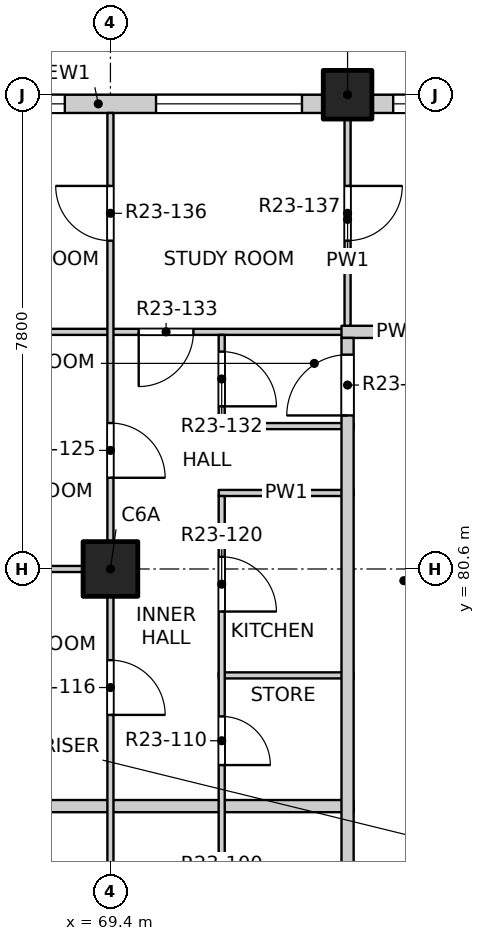
"""IFC4 building model, lengths in metres.
Left out: names, types, materials, properties, quantities, classifications, styles, units other than length and angle.
Written with IfcOpenShell. Run it as: python <this file> out.ifc"""

import sys

from ifc_helpers import new_model, si_unit, direction, frame, frame_2d, origin, origin_2d, place, context, subcontext, project, spatial, rectangle, extrude, element, fill, save


model = new_model("IFC4")
c1 = context("Model", 3, precision=1e-05, world=origin(), true_north=direction((0.0, 1.0)))
c2 = subcontext(c1, "Body", "Model", "MODEL_VIEW")
j1 = project(units=[si_unit("LENGTHUNIT", "METRE"), si_unit("PLANEANGLEUNIT", "RADIAN")], contexts=[c1])
p1 = place(None, origin())
s1 = spatial("IfcSite", under=j1, at=p1, CompositionType="ELEMENT")
p2 = place(p1, origin())
s2 = spatial("IfcBuilding", under=s1, at=p2, CompositionType="ELEMENT")
p3 = place(p2, frame((0.0, 0.0, 238.1)))
s3 = spatial("IfcBuildingStorey", under=s2, at=p3, CompositionType="ELEMENT", Elevation=238.1)
p4 = place(p3, frame((73.3, 88.4, -0.25), z_axis=(0.0, 0.0, 1.0), x_axis=(1.0, 0.0, 0.0)))
e1 = element("IfcColumn", 1, at=p4, inside=s3, PredefinedType="COLUMN", context=c2, shape_type="SweptSolid", body=[
    extrude(rectangle(XDim=0.8, YDim=0.8, at=origin_2d()), origin(), (0.0, 0.0, 1.0), 3.35),
])
p5 = place(p3, frame((69.4, 80.6, -0.25), z_axis=(0.0, 0.0, 1.0), x_axis=(1.0, 0.0, 0.0)))
e2 = element("IfcColumn", 2, at=p5, inside=s3, PredefinedType="COLUMN", context=c2, shape_type="SweptSolid", body=[
    extrude(rectangle(XDim=0.9, YDim=0.9, at=origin_2d()), origin(), (0.0, 0.0, 1.0), 3.35),
])
p6 = place(p3, frame((65.5, 88.25, 0.0), z_axis=(0.0, 0.0, 1.0), x_axis=(1.0, 0.0, 0.0)))
e3 = element("IfcWall", 3, at=p6, inside=s3, PredefinedType="SOLIDWALL", context=c2, shape_type="SweptSolid", body=[
    extrude(rectangle(XDim=7.4, YDim=0.3, at=frame_2d((3.7, 0.0))), origin(), (0.0, 0.0, 1.0), 3.1),
])
p7 = place(p6, frame((0.75, 0.0, 0.9)))
e4 = element("IfcOpeningElement", 4, at=p7, cuts=e3, PredefinedType="OPENING", context=c2, shape_type="SweptSolid", body=[
    extrude(rectangle(XDim=2.4, YDim=1.8, at=frame_2d((1.2, 0.9))), frame((0.0, 0.16, 0.0), z_axis=(0.0, -1.0, 0.0), x_axis=(1.0, 0.0, 0.0)), (0.0, 0.0, 1.0), 0.32),
])
p8 = place(p6, frame((4.65, 0.0, 0.9)))
e5 = element("IfcOpeningElement", 5, at=p8, cuts=e3, PredefinedType="OPENING", context=c2, shape_type="SweptSolid", body=[
    extrude(rectangle(XDim=2.4, YDim=1.8, at=frame_2d((1.2, 0.9))), frame((0.0, 0.16, 0.0), z_axis=(0.0, -1.0, 0.0), x_axis=(1.0, 0.0, 0.0)), (0.0, 0.0, 1.0), 0.32),
])
p9 = place(p3, frame((73.7, 88.25, 0.0), z_axis=(0.0, 0.0, 1.0), x_axis=(1.0, 0.0, 0.0)))
e6 = element("IfcWall", 6, at=p9, inside=s3, PredefinedType="SOLIDWALL", context=c2, shape_type="SweptSolid", body=[
    extrude(rectangle(XDim=22.6, YDim=0.3, at=frame_2d((11.3, 0.0))), origin(), (0.0, 0.0, 1.0), 3.1),
])
p10 = place(p9, frame((0.35, 0.0, 0.9)))
e7 = element("IfcOpeningElement", 7, at=p10, cuts=e6, PredefinedType="OPENING", context=c2, shape_type="SweptSolid", body=[
    extrude(rectangle(XDim=2.4, YDim=1.8, at=frame_2d((1.2, 0.9))), frame((0.0, 0.16, 0.0), z_axis=(0.0, -1.0, 0.0), x_axis=(1.0, 0.0, 0.0)), (0.0, 0.0, 1.0), 0.32),
])
p11 = place(p9, frame((4.25, 0.0, 0.9)))
e8 = element("IfcOpeningElement", 8, at=p11, cuts=e6, PredefinedType="OPENING", context=c2, shape_type="SweptSolid", body=[
    extrude(rectangle(XDim=2.4, YDim=1.8, at=frame_2d((1.2, 0.9))), frame((0.0, 0.16, 0.0), z_axis=(0.0, -1.0, 0.0), x_axis=(1.0, 0.0, 0.0)), (0.0, 0.0, 1.0), 0.32),
])
p12 = place(p9, frame((8.15, 0.0, 0.9)))
e9 = element("IfcOpeningElement", 9, at=p12, cuts=e6, PredefinedType="OPENING", context=c2, shape_type="SweptSolid", body=[
    extrude(rectangle(XDim=2.4, YDim=1.8, at=frame_2d((1.2, 0.9))), frame((0.0, 0.16, 0.0), z_axis=(0.0, -1.0, 0.0), x_axis=(1.0, 0.0, 0.0)), (0.0, 0.0, 1.0), 0.32),
])
p13 = place(p9, frame((12.05, 0.0, 0.9)))
e10 = element("IfcOpeningElement", 10, at=p13, cuts=e6, PredefinedType="OPENING", context=c2, shape_type="SweptSolid", body=[
    extrude(rectangle(XDim=2.4, YDim=1.8, at=frame_2d((1.2, 0.9))), frame((0.0, 0.16, 0.0), z_axis=(0.0, -1.0, 0.0), x_axis=(1.0, 0.0, 0.0)), (0.0, 0.0, 1.0), 0.32),
])
p14 = place(p9, frame((15.95, 0.0, 0.9)))
e11 = element("IfcOpeningElement", 11, at=p14, cuts=e6, PredefinedType="OPENING", context=c2, shape_type="SweptSolid", body=[
    extrude(rectangle(XDim=2.4, YDim=1.8, at=frame_2d((1.2, 0.9))), frame((0.0, 0.16, 0.0), z_axis=(0.0, -1.0, 0.0), x_axis=(1.0, 0.0, 0.0)), (0.0, 0.0, 1.0), 0.32),
])
p15 = place(p9, frame((19.85, 0.0, 0.9)))
e12 = element("IfcOpeningElement", 12, at=p15, cuts=e6, PredefinedType="OPENING", context=c2, shape_type="SweptSolid", body=[
    extrude(rectangle(XDim=2.4, YDim=1.8, at=frame_2d((1.2, 0.9))), frame((0.0, 0.16, 0.0), z_axis=(0.0, -1.0, 0.0), x_axis=(1.0, 0.0, 0.0)), (0.0, 0.0, 1.0), 0.32),
])
p16 = place(p3, frame((61.9, 76.7, 0.0), z_axis=(0.0, 0.0, 1.0), x_axis=(1.0, 0.0, 0.0)))
e13 = element("IfcWall", 13, at=p16, inside=s3, PredefinedType="PARTITIONING", context=c2, shape_type="SweptSolid", body=[
    extrude(rectangle(XDim=11.5, YDim=0.2, at=frame_2d((5.75, 0.0))), origin(), (0.0, 0.0, 1.0), 3.1),
])
p17 = place(p3, frame((71.18, 78.85, 0.0), z_axis=(0.0, 0.0, 1.0), x_axis=(1.0, 0.0, 0.0)))
e14 = element("IfcWall", 14, at=p17, inside=s3, PredefinedType="PARTITIONING", context=c2, shape_type="SweptSolid", body=[
    extrude(rectangle(XDim=2.22, YDim=0.1, at=frame_2d((1.11, 0.0))), origin(), (0.0, 0.0, 1.0), 3.1),
])
p18 = place(p3, frame((61.9, 80.6, 0.0), z_axis=(0.0, 0.0, 1.0), x_axis=(1.0, 0.0, 0.0)))
e15 = element("IfcWall", 15, at=p18, inside=s3, PredefinedType="PARTITIONING", context=c2, shape_type="SweptSolid", body=[
    extrude(rectangle(XDim=7.55, YDim=0.1, at=frame_2d((3.775, 0.0))), origin(), (0.0, 0.0, 1.0), 3.1),
])
for number, where, z_axis, x_axis in (
    (16, (71.18, 81.85, 0.0), (0.0, 0.0, 1.0), (1.0, 0.0, 0.0)),
    (17, (71.18, 82.95, 0.0), (0.0, 0.0, 1.0), (1.0, 0.0, 0.0)),
):
    element("IfcWall", number, at=place(p3, frame(where, z_axis=z_axis, x_axis=x_axis)), inside=s3, PredefinedType="PARTITIONING", context=c2, shape_type="SweptSolid", body=[
        extrude(rectangle(XDim=2.22, YDim=0.1, at=frame_2d((1.11, 0.0))), origin(), (0.0, 0.0, 1.0), 3.1),
    ])
p19 = place(p3, frame((61.9, 84.5, 0.0), z_axis=(0.0, 0.0, 1.0), x_axis=(1.0, 0.0, 0.0)))
e18 = element("IfcWall", 18, at=p19, inside=s3, PredefinedType="PARTITIONING", context=c2, shape_type="SweptSolid", body=[
    extrude(rectangle(XDim=11.5, YDim=0.1, at=frame_2d((5.75, 0.0))), origin(), (0.0, 0.0, 1.0), 3.1),
])
p20 = place(p19, frame((7.965, 0.0, 0.0)))
e19 = element("IfcOpeningElement", 19, at=p20, cuts=e18, PredefinedType="OPENING", context=c2, shape_type="SweptSolid", body=[
    extrude(rectangle(XDim=0.9, YDim=2.1, at=frame_2d((0.45, 1.05))), frame((0.0, 0.06, 0.0), z_axis=(0.0, -1.0, 0.0), x_axis=(1.0, 0.0, 0.0)), (0.0, 0.0, 1.0), 0.12),
])
p21 = place(p3, frame((73.2, 84.5, 0.0), z_axis=(0.0, 0.0, 1.0), x_axis=(1.0, 0.0, 0.0)))
e20 = element("IfcWall", 20, at=p21, inside=s3, PredefinedType="PARTITIONING", context=c2, shape_type="SweptSolid", body=[
    extrude(rectangle(XDim=1.85, YDim=0.2, at=frame_2d((0.925, 0.0))), origin(), (0.0, 0.0, 1.0), 3.1),
])
p22 = place(p3, frame((69.4, 41.9, 0.0), z_axis=(0.0, 0.0, 1.0), x_axis=(0.0, 1.0, 0.0)))
e21 = element("IfcWall", 21, at=p22, inside=s3, PredefinedType="PARTITIONING", context=c2, shape_type="SweptSolid", body=[
    extrude(rectangle(XDim=46.2, YDim=0.1, at=frame_2d((23.1, 0.0))), origin(), (0.0, 0.0, 1.0), 3.1),
])
p23 = place(p22, frame((1.2, 0.0, 0.0)))
e22 = element("IfcOpeningElement", 22, at=p23, cuts=e21, PredefinedType="OPENING", context=c2, shape_type="SweptSolid", body=[
    extrude(rectangle(XDim=0.9, YDim=2.1, at=frame_2d((0.45, 1.05))), frame((0.0, 0.06, 0.0), z_axis=(0.0, -1.0, 0.0), x_axis=(1.0, 0.0, 0.0)), (0.0, 0.0, 1.0), 0.12),
])
p24 = place(p22, frame((6.025, 0.0, 0.0)))
e23 = element("IfcOpeningElement", 23, at=p24, cuts=e21, PredefinedType="OPENING", context=c2, shape_type="SweptSolid", body=[
    extrude(rectangle(XDim=0.9, YDim=2.1, at=frame_2d((0.45, 1.05))), frame((0.0, 0.06, 0.0), z_axis=(0.0, -1.0, 0.0), x_axis=(1.0, 0.0, 0.0)), (0.0, 0.0, 1.0), 0.12),
])
p25 = place(p22, frame((9.975, 0.0, 0.0)))
e24 = element("IfcOpeningElement", 24, at=p25, cuts=e21, PredefinedType="OPENING", context=c2, shape_type="SweptSolid", body=[
    extrude(rectangle(XDim=0.9, YDim=2.1, at=frame_2d((0.45, 1.05))), frame((0.0, 0.06, 0.0), z_axis=(0.0, -1.0, 0.0), x_axis=(1.0, 0.0, 0.0)), (0.0, 0.0, 1.0), 0.12),
])
p26 = place(p22, frame((12.9, 0.0, 0.0)))
e25 = element("IfcOpeningElement", 25, at=p26, cuts=e21, PredefinedType="OPENING", context=c2, shape_type="SweptSolid", body=[
    extrude(rectangle(XDim=0.9, YDim=2.1, at=frame_2d((0.45, 1.05))), frame((0.0, 0.06, 0.0), z_axis=(0.0, -1.0, 0.0), x_axis=(1.0, 0.0, 0.0)), (0.0, 0.0, 1.0), 0.12),
])
p27 = place(p22, frame((17.775, 0.0, 0.0)))
e26 = element("IfcOpeningElement", 26, at=p27, cuts=e21, PredefinedType="OPENING", context=c2, shape_type="SweptSolid", body=[
    extrude(rectangle(XDim=0.9, YDim=2.1, at=frame_2d((0.45, 1.05))), frame((0.0, 0.06, 0.0), z_axis=(0.0, -1.0, 0.0), x_axis=(1.0, 0.0, 0.0)), (0.0, 0.0, 1.0), 0.12),
])
p28 = place(p22, frame((21.625, 0.0, 0.0)))
e27 = element("IfcOpeningElement", 27, at=p28, cuts=e21, PredefinedType="OPENING", context=c2, shape_type="SweptSolid", body=[
    extrude(rectangle(XDim=0.9, YDim=2.1, at=frame_2d((0.45, 1.05))), frame((0.0, 0.06, 0.0), z_axis=(0.0, -1.0, 0.0), x_axis=(1.0, 0.0, 0.0)), (0.0, 0.0, 1.0), 0.12),
])
p29 = place(p22, frame((25.575, 0.0, 0.0)))
e28 = element("IfcOpeningElement", 28, at=p29, cuts=e21, PredefinedType="OPENING", context=c2, shape_type="SweptSolid", body=[
    extrude(rectangle(XDim=0.9, YDim=2.1, at=frame_2d((0.45, 1.05))), frame((0.0, 0.06, 0.0), z_axis=(0.0, -1.0, 0.0), x_axis=(1.0, 0.0, 0.0)), (0.0, 0.0, 1.0), 0.12),
])
p30 = place(p22, frame((28.5, 0.0, 0.0)))
e29 = element("IfcOpeningElement", 29, at=p30, cuts=e21, PredefinedType="OPENING", context=c2, shape_type="SweptSolid", body=[
    extrude(rectangle(XDim=0.9, YDim=2.1, at=frame_2d((0.45, 1.05))), frame((0.0, 0.06, 0.0), z_axis=(0.0, -1.0, 0.0), x_axis=(1.0, 0.0, 0.0)), (0.0, 0.0, 1.0), 0.12),
])
p31 = place(p22, frame((32.4, 0.0, 0.0)))
e30 = element("IfcOpeningElement", 30, at=p31, cuts=e21, PredefinedType="OPENING", context=c2, shape_type="SweptSolid", body=[
    extrude(rectangle(XDim=0.9, YDim=2.1, at=frame_2d((0.45, 1.05))), frame((0.0, 0.06, 0.0), z_axis=(0.0, -1.0, 0.0), x_axis=(1.0, 0.0, 0.0)), (0.0, 0.0, 1.0), 0.12),
])
p32 = place(p22, frame((36.3, 0.0, 0.0)))
e31 = element("IfcOpeningElement", 31, at=p32, cuts=e21, PredefinedType="OPENING", context=c2, shape_type="SweptSolid", body=[
    extrude(rectangle(XDim=0.9, YDim=2.1, at=frame_2d((0.45, 1.05))), frame((0.0, 0.06, 0.0), z_axis=(0.0, -1.0, 0.0), x_axis=(1.0, 0.0, 0.0)), (0.0, 0.0, 1.0), 0.12),
])
p33 = place(p22, frame((40.2, 0.0, 0.0)))
e32 = element("IfcOpeningElement", 32, at=p33, cuts=e21, PredefinedType="OPENING", context=c2, shape_type="SweptSolid", body=[
    extrude(rectangle(XDim=0.9, YDim=2.1, at=frame_2d((0.45, 1.05))), frame((0.0, 0.06, 0.0), z_axis=(0.0, -1.0, 0.0), x_axis=(1.0, 0.0, 0.0)), (0.0, 0.0, 1.0), 0.12),
])
p34 = place(p22, frame((44.1, 0.0, 0.0)))
e33 = element("IfcOpeningElement", 33, at=p34, cuts=e21, PredefinedType="OPENING", context=c2, shape_type="SweptSolid", body=[
    extrude(rectangle(XDim=0.9, YDim=2.1, at=frame_2d((0.45, 1.05))), frame((0.0, 0.06, 0.0), z_axis=(0.0, -1.0, 0.0), x_axis=(1.0, 0.0, 0.0)), (0.0, 0.0, 1.0), 0.12),
])
p35 = place(p3, frame((71.23, 63.95, 0.0), z_axis=(0.0, 0.0, 1.0), x_axis=(0.0, 1.0, 0.0)))
e34 = element("IfcWall", 34, at=p35, inside=s3, PredefinedType="PARTITIONING", context=c2, shape_type="SweptSolid", body=[
    extrude(rectangle(XDim=17.85, YDim=0.1, at=frame_2d((8.925, 0.0))), origin(), (0.0, 0.0, 1.0), 3.1),
])
p36 = place(p35, frame((0.7, 0.0, 0.0)))
e35 = element("IfcOpeningElement", 35, at=p36, cuts=e34, PredefinedType="OPENING", context=c2, shape_type="SweptSolid", body=[
    extrude(rectangle(XDim=0.9, YDim=2.1, at=frame_2d((0.45, 1.05))), frame((0.0, 0.06, 0.0), z_axis=(0.0, -1.0, 0.0), x_axis=(1.0, 0.0, 0.0)), (0.0, 0.0, 1.0), 0.12),
])
p37 = place(p35, frame((3.1, 0.0, 0.0)))
e36 = element("IfcOpeningElement", 36, at=p37, cuts=e34, PredefinedType="OPENING", context=c2, shape_type="SweptSolid", body=[
    extrude(rectangle(XDim=0.8, YDim=2.1, at=frame_2d((0.4, 1.05))), frame((0.0, 0.06, 0.0), z_axis=(0.0, -1.0, 0.0), x_axis=(1.0, 0.0, 0.0)), (0.0, 0.0, 1.0), 0.12),
])
p38 = place(p35, frame((5.115, 0.0, 0.0)))
e37 = element("IfcOpeningElement", 37, at=p38, cuts=e34, PredefinedType="OPENING", context=c2, shape_type="SweptSolid", body=[
    extrude(rectangle(XDim=0.9, YDim=2.1, at=frame_2d((0.45, 1.05))), frame((0.0, 0.06, 0.0), z_axis=(0.0, -1.0, 0.0), x_axis=(1.0, 0.0, 0.0)), (0.0, 0.0, 1.0), 0.12),
])
p39 = place(p35, frame((7.455, 0.0, 0.0)))
e38 = element("IfcOpeningElement", 38, at=p39, cuts=e34, PredefinedType="OPENING", context=c2, shape_type="SweptSolid", body=[
    extrude(rectangle(XDim=0.8, YDim=2.1, at=frame_2d((0.4, 1.05))), frame((0.0, 0.06, 0.0), z_axis=(0.0, -1.0, 0.0), x_axis=(1.0, 0.0, 0.0)), (0.0, 0.0, 1.0), 0.12),
])
p40 = place(p35, frame((10.54, 0.0, 0.0)))
e39 = element("IfcOpeningElement", 39, at=p40, cuts=e34, PredefinedType="OPENING", context=c2, shape_type="SweptSolid", body=[
    extrude(rectangle(XDim=0.9, YDim=2.1, at=frame_2d((0.45, 1.05))), frame((0.0, 0.06, 0.0), z_axis=(0.0, -1.0, 0.0), x_axis=(1.0, 0.0, 0.0)), (0.0, 0.0, 1.0), 0.12),
])
p41 = place(p35, frame((13.425, 0.0, 0.0)))
e40 = element("IfcOpeningElement", 40, at=p41, cuts=e34, PredefinedType="OPENING", context=c2, shape_type="SweptSolid", body=[
    extrude(rectangle(XDim=0.8, YDim=2.1, at=frame_2d((0.4, 1.05))), frame((0.0, 0.06, 0.0), z_axis=(0.0, -1.0, 0.0), x_axis=(1.0, 0.0, 0.0)), (0.0, 0.0, 1.0), 0.12),
])
p42 = place(p35, frame((15.95, 0.0, 0.0)))
e41 = element("IfcOpeningElement", 41, at=p42, cuts=e34, PredefinedType="OPENING", context=c2, shape_type="SweptSolid", body=[
    extrude(rectangle(XDim=0.9, YDim=2.1, at=frame_2d((0.45, 1.05))), frame((0.0, 0.06, 0.0), z_axis=(0.0, -1.0, 0.0), x_axis=(1.0, 0.0, 0.0)), (0.0, 0.0, 1.0), 0.12),
])
p43 = place(p3, frame((71.23, 83.0, 0.0), z_axis=(0.0, 0.0, 1.0), x_axis=(0.0, 1.0, 0.0)))
e42 = element("IfcWall", 42, at=p43, inside=s3, PredefinedType="PARTITIONING", context=c2, shape_type="SweptSolid", body=[
    extrude(rectangle(XDim=1.45, YDim=0.1, at=frame_2d((0.725, 0.0))), origin(), (0.0, 0.0, 1.0), 3.1),
])
p44 = place(p43, frame((0.275, 0.0, 0.0)))
e43 = element("IfcOpeningElement", 43, at=p44, cuts=e42, PredefinedType="OPENING", context=c2, shape_type="SweptSolid", body=[
    extrude(rectangle(XDim=0.9, YDim=2.1, at=frame_2d((0.45, 1.05))), frame((0.0, 0.06, 0.0), z_axis=(0.0, -1.0, 0.0), x_axis=(1.0, 0.0, 0.0)), (0.0, 0.0, 1.0), 0.12),
])
p45 = place(p3, frame((73.3, 49.5, 0.0), z_axis=(0.0, 0.0, 1.0), x_axis=(0.0, 1.0, 0.0)))
e44 = element("IfcWall", 44, at=p45, inside=s3, PredefinedType="PARTITIONING", context=c2, shape_type="SweptSolid", body=[
    extrude(rectangle(XDim=34.9, YDim=0.2, at=frame_2d((17.45, 0.0))), origin(), (0.0, 0.0, 1.0), 3.1),
])
p46 = place(p45, frame((3.075, 0.0, 0.0)))
e45 = element("IfcOpeningElement", 45, at=p46, cuts=e44, PredefinedType="OPENING", context=c2, shape_type="SweptSolid", body=[
    extrude(rectangle(XDim=1.0, YDim=2.1, at=frame_2d((0.5, 1.05))), frame((0.0, 0.11, 0.0), z_axis=(0.0, -1.0, 0.0), x_axis=(1.0, 0.0, 0.0)), (0.0, 0.0, 1.0), 0.22),
])
p47 = place(p45, frame((14.575, 0.0, 0.0)))
e46 = element("IfcOpeningElement", 46, at=p47, cuts=e44, PredefinedType="OPENING", context=c2, shape_type="SweptSolid", body=[
    extrude(rectangle(XDim=1.0, YDim=2.1, at=frame_2d((0.5, 1.05))), frame((0.0, 0.11, 0.0), z_axis=(0.0, -1.0, 0.0), x_axis=(1.0, 0.0, 0.0)), (0.0, 0.0, 1.0), 0.22),
])
p48 = place(p45, frame((33.625, 0.0, 0.0)))
e47 = element("IfcOpeningElement", 47, at=p48, cuts=e44, PredefinedType="OPENING", context=c2, shape_type="SweptSolid", body=[
    extrude(rectangle(XDim=1.0, YDim=2.1, at=frame_2d((0.5, 1.05))), frame((0.0, 0.11, 0.0), z_axis=(0.0, -1.0, 0.0), x_axis=(1.0, 0.0, 0.0)), (0.0, 0.0, 1.0), 0.22),
])
p49 = place(p3, frame((73.3, 84.6, 0.0), z_axis=(0.0, 0.0, 1.0), x_axis=(0.0, 1.0, 0.0)))
e48 = element("IfcWall", 48, at=p49, inside=s3, PredefinedType="PARTITIONING", context=c2, shape_type="SweptSolid", body=[
    extrude(rectangle(XDim=3.5, YDim=0.1, at=frame_2d((1.75, 0.0))), origin(), (0.0, 0.0, 1.0), 3.1),
])
p50 = place(p49, frame((1.4, 0.0, 0.0)))
e49 = element("IfcOpeningElement", 49, at=p50, cuts=e48, PredefinedType="OPENING", context=c2, shape_type="SweptSolid", body=[
    extrude(rectangle(XDim=0.9, YDim=2.1, at=frame_2d((0.45, 1.05))), frame((0.0, 0.06, 0.0), z_axis=(0.0, -1.0, 0.0), x_axis=(1.0, 0.0, 0.0)), (0.0, 0.0, 1.0), 0.12),
])
p51 = place(p7, origin())
e50 = element("IfcWindow", 50, at=p51, inside=s3, PartitioningType="DOUBLE_PANEL_VERTICAL", PredefinedType="WINDOW", context=c2, shape_type="SweptSolid", body=[
    extrude(rectangle(XDim=2.4, YDim=1.8, at=frame_2d((1.2, 0.9))), frame((0.0, 0.03, 0.0), z_axis=(0.0, -1.0, 0.0), x_axis=(1.0, 0.0, 0.0)), (0.0, 0.0, 1.0), 0.06),
])
fill(e4, e50)
p52 = place(p8, origin())
e51 = element("IfcWindow", 51, at=p52, inside=s3, PartitioningType="DOUBLE_PANEL_VERTICAL", PredefinedType="WINDOW", context=c2, shape_type="SweptSolid", body=[
    extrude(rectangle(XDim=2.4, YDim=1.8, at=frame_2d((1.2, 0.9))), frame((0.0, 0.03, 0.0), z_axis=(0.0, -1.0, 0.0), x_axis=(1.0, 0.0, 0.0)), (0.0, 0.0, 1.0), 0.06),
])
fill(e5, e51)
p53 = place(p10, origin())
e52 = element("IfcWindow", 52, at=p53, inside=s3, PartitioningType="DOUBLE_PANEL_VERTICAL", PredefinedType="WINDOW", context=c2, shape_type="SweptSolid", body=[
    extrude(rectangle(XDim=2.4, YDim=1.8, at=frame_2d((1.2, 0.9))), frame((0.0, 0.03, 0.0), z_axis=(0.0, -1.0, 0.0), x_axis=(1.0, 0.0, 0.0)), (0.0, 0.0, 1.0), 0.06),
])
fill(e7, e52)
p54 = place(p41, origin())
e53 = element("IfcDoor", 53, at=p54, inside=s3, OperationType="SINGLE_SWING_RIGHT", PredefinedType="DOOR", context=c2, shape_type="SweptSolid", body=[
    extrude(rectangle(XDim=0.8, YDim=2.1, at=frame_2d((0.4, 1.05))), frame((0.0, 0.025, 0.0), z_axis=(0.0, -1.0, 0.0), x_axis=(1.0, 0.0, 0.0)), (0.0, 0.0, 1.0), 0.05),
])
fill(e40, e53)
p55 = place(p32, origin())
e54 = element("IfcDoor", 54, at=p55, inside=s3, OperationType="SINGLE_SWING_RIGHT", PredefinedType="DOOR", context=c2, shape_type="SweptSolid", body=[
    extrude(rectangle(XDim=0.9, YDim=2.1, at=frame_2d((0.45, 1.05))), frame((0.0, 0.025, 0.0), z_axis=(0.0, -1.0, 0.0), x_axis=(1.0, 0.0, 0.0)), (0.0, 0.0, 1.0), 0.05),
])
fill(e31, e54)
p56 = place(p42, origin())
e55 = element("IfcDoor", 55, at=p56, inside=s3, OperationType="SINGLE_SWING_RIGHT", PredefinedType="DOOR", context=c2, shape_type="SweptSolid", body=[
    extrude(rectangle(XDim=0.9, YDim=2.1, at=frame_2d((0.45, 1.05))), frame((0.0, 0.025, 0.0), z_axis=(0.0, -1.0, 0.0), x_axis=(1.0, 0.0, 0.0)), (0.0, 0.0, 1.0), 0.05),
])
fill(e41, e55)
p57 = place(p33, origin())
e56 = element("IfcDoor", 56, at=p57, inside=s3, OperationType="SINGLE_SWING_RIGHT", PredefinedType="DOOR", context=c2, shape_type="SweptSolid", body=[
    extrude(rectangle(XDim=0.9, YDim=2.1, at=frame_2d((0.45, 1.05))), frame((0.0, 0.025, 0.0), z_axis=(0.0, -1.0, 0.0), x_axis=(1.0, 0.0, 0.0)), (0.0, 0.0, 1.0), 0.05),
])
fill(e32, e56)
p58 = place(p48, origin())
e57 = element("IfcDoor", 57, at=p58, inside=s3, OperationType="SINGLE_SWING_RIGHT", PredefinedType="DOOR", context=c2, shape_type="SweptSolid", body=[
    extrude(rectangle(XDim=1.0, YDim=2.1, at=frame_2d((0.5, 1.05))), frame((0.0, 0.025, 0.0), z_axis=(0.0, -1.0, 0.0), x_axis=(1.0, 0.0, 0.0)), (0.0, 0.0, 1.0), 0.05),
])
fill(e47, e57)
p59 = place(p44, origin())
e58 = element("IfcDoor", 58, at=p59, inside=s3, OperationType="SINGLE_SWING_RIGHT", PredefinedType="DOOR", context=c2, shape_type="SweptSolid", body=[
    extrude(rectangle(XDim=0.9, YDim=2.1, at=frame_2d((0.45, 1.05))), frame((0.0, 0.025, 0.0), z_axis=(0.0, -1.0, 0.0), x_axis=(1.0, 0.0, 0.0)), (0.0, 0.0, 1.0), 0.05),
])
fill(e43, e58)
p60 = place(p20, origin())
e59 = element("IfcDoor", 59, at=p60, inside=s3, OperationType="SINGLE_SWING_RIGHT", PredefinedType="DOOR", context=c2, shape_type="SweptSolid", body=[
    extrude(rectangle(XDim=0.9, YDim=2.1, at=frame_2d((0.45, 1.05))), frame((0.0, 0.025, 0.0), z_axis=(0.0, -1.0, 0.0), x_axis=(1.0, 0.0, 0.0)), (0.0, 0.0, 1.0), 0.05),
])
fill(e19, e59)
p61 = place(p34, origin())
e60 = element("IfcDoor", 60, at=p61, inside=s3, OperationType="SINGLE_SWING_RIGHT", PredefinedType="DOOR", context=c2, shape_type="SweptSolid", body=[
    extrude(rectangle(XDim=0.9, YDim=2.1, at=frame_2d((0.45, 1.05))), frame((0.0, 0.025, 0.0), z_axis=(0.0, -1.0, 0.0), x_axis=(1.0, 0.0, 0.0)), (0.0, 0.0, 1.0), 0.05),
])
fill(e33, e60)
p62 = place(p50, origin())
e61 = element("IfcDoor", 61, at=p62, inside=s3, OperationType="SINGLE_SWING_LEFT", PredefinedType="DOOR", context=c2, shape_type="SweptSolid", body=[
    extrude(rectangle(XDim=0.9, YDim=2.1, at=frame_2d((0.45, 1.05))), frame((0.0, 0.025, 0.0), z_axis=(0.0, -1.0, 0.0), x_axis=(1.0, 0.0, 0.0)), (0.0, 0.0, 1.0), 0.05),
])
fill(e49, e61)
save(model, sys.argv[1])
